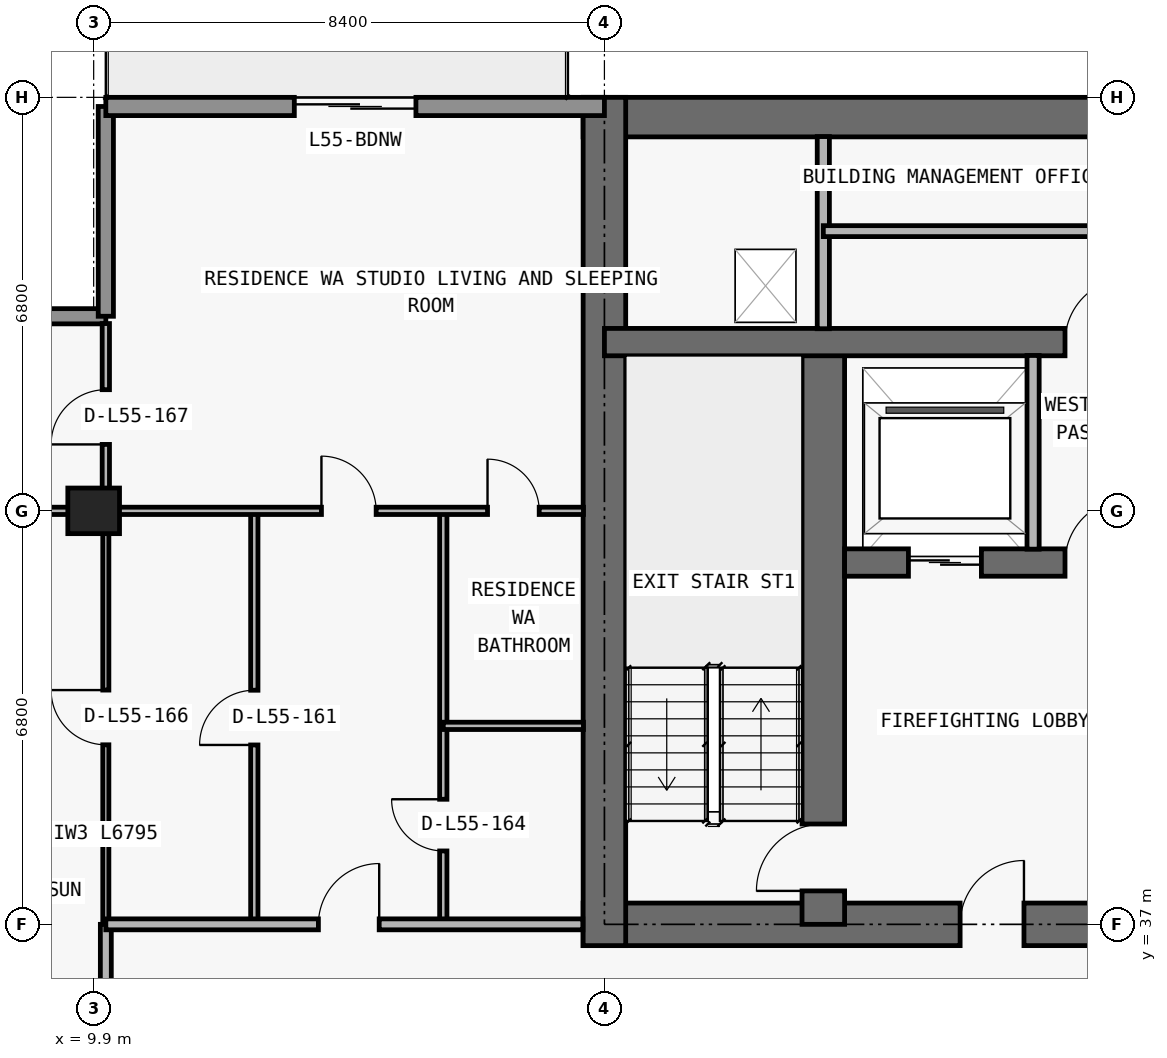
"""IFC4 building model, lengths in metres.
Left out: names, types, materials, properties, quantities, classifications, styles, units other than length and angle.
Written with IfcOpenShell. Run it as: python <this file> out.ifc"""

import sys

from ifc_helpers import new_model, si_unit, direction, frame, frame_2d, origin, origin_2d, place, context, subcontext, project, spatial, rectangle, extrude, element, fill, save


model = new_model("IFC4")
c1 = context("Model", 3, precision=1e-05, world=origin(), true_north=direction((0.0, 1.0)))
c2 = subcontext(c1, "Body", "Model", "MODEL_VIEW")
j1 = project(units=[si_unit("LENGTHUNIT", "METRE"), si_unit("PLANEANGLEUNIT", "RADIAN")], contexts=[c1])
p1 = place(None, origin())
s1 = spatial("IfcSite", under=j1, at=p1, CompositionType="ELEMENT")
p2 = place(p1, origin())
s2 = spatial("IfcBuilding", under=s1, at=p2, CompositionType="ELEMENT")
p3 = place(p2, frame((0.0, 0.0, 198.3)))
s3 = spatial("IfcBuildingStorey", under=s2, at=p3, CompositionType="ELEMENT", Elevation=198.3)
p4 = place(p3, frame((9.9, 43.8, 0.0), z_axis=(0.0, 0.0, 1.0), x_axis=(1.0, 0.0, 0.0)))
e1 = element("IfcColumn", 1, at=p4, inside=s3, PredefinedType="COLUMN", context=c2, shape_type="SweptSolid", body=[
    extrude(rectangle(XDim=0.85, YDim=0.75, at=origin_2d()), origin(), (0.0, 0.0, 1.0), 3.05),
])
p5 = place(p3, frame((17.95, 37.0, 0.0), z_axis=(0.0, 0.0, 1.0), x_axis=(1.0, 0.0, 0.0)))
e2 = element("IfcWall", 2, at=p5, inside=s3, PredefinedType="SHEAR", context=c2, shape_type="SweptSolid", body=[
    extrude(rectangle(XDim=41.9, YDim=0.7, at=frame_2d((20.95, 0.0))), origin(), (0.0, 0.0, 1.0), 3.05),
])
p6 = place(p5, frame((14.35, 0.0, 0.0)))
e3 = element("IfcOpeningElement", 3, at=p6, cuts=e2, PredefinedType="OPENING", context=c2, shape_type="SweptSolid", body=[
    extrude(rectangle(XDim=1.1, YDim=2.15, at=frame_2d((0.55, 1.075))), frame((0.0, 0.36, 0.0), z_axis=(0.0, -1.0, 0.0), x_axis=(1.0, 0.0, 0.0)), (0.0, 0.0, 1.0), 0.72),
])
p7 = place(p5, frame((6.2, 0.0, 0.0)))
e4 = element("IfcOpeningElement", 4, at=p7, cuts=e2, PredefinedType="OPENING", context=c2, shape_type="SweptSolid", body=[
    extrude(rectangle(XDim=1.05, YDim=2.15, at=frame_2d((0.525, 1.075))), frame((0.0, 0.36, 0.0), z_axis=(0.0, -1.0, 0.0), x_axis=(1.0, 0.0, 0.0)), (0.0, 0.0, 1.0), 0.72),
])
p8 = place(p5, frame((34.7, 0.0, 0.0)))
e5 = element("IfcOpeningElement", 5, at=p8, cuts=e2, PredefinedType="OPENING", context=c2, shape_type="SweptSolid", body=[
    extrude(rectangle(XDim=1.05, YDim=2.15, at=frame_2d((0.525, 1.075))), frame((0.0, 0.36, 0.0), z_axis=(0.0, -1.0, 0.0), x_axis=(1.0, 0.0, 0.0)), (0.0, 0.0, 1.0), 0.72),
])
p9 = place(p5, frame((10.812, 0.0, 0.0)))
e6 = element("IfcOpeningElement", 6, at=p9, cuts=e2, PredefinedType="OPENING", context=c2, shape_type="SweptSolid", body=[
    extrude(rectangle(XDim=1.05, YDim=2.15, at=frame_2d((0.525, 1.075))), frame((0.0, 0.36, 0.0), z_axis=(0.0, -1.0, 0.0), x_axis=(1.0, 0.0, 0.0)), (0.0, 0.0, 1.0), 0.72),
])
p10 = place(p5, frame((24.05, 0.0, 0.0)))
e7 = element("IfcOpeningElement", 7, at=p10, cuts=e2, PredefinedType="OPENING", context=c2, shape_type="SweptSolid", body=[
    extrude(rectangle(XDim=1.05, YDim=2.15, at=frame_2d((0.525, 1.075))), frame((0.0, 0.36, 0.0), z_axis=(0.0, -1.0, 0.0), x_axis=(1.0, 0.0, 0.0)), (0.0, 0.0, 1.0), 0.72),
])
p11 = place(p3, frame((17.95, 50.275, 0.0), z_axis=(0.0, 0.0, 1.0), x_axis=(1.0, 0.0, 0.0)))
e8 = element("IfcWall", 8, at=p11, inside=s3, PredefinedType="SHEAR", context=c2, shape_type="SweptSolid", body=[
    extrude(rectangle(XDim=41.9, YDim=0.65, at=frame_2d((20.95, 0.0))), origin(), (0.0, 0.0, 1.0), 3.05),
])
p12 = place(p3, frame((18.3, 36.65, 0.0), z_axis=(0.0, 0.0, 1.0), x_axis=(0.0, 1.0, 0.0)))
e9 = element("IfcWall", 9, at=p12, inside=s3, PredefinedType="SHEAR", context=c2, shape_type="SweptSolid", body=[
    extrude(rectangle(XDim=13.95, YDim=0.7, at=frame_2d((6.975, 0.0))), origin(), (0.0, 0.0, 1.0), 3.05),
])
p13 = place(p3, frame((21.9, 37.0, 0.0), z_axis=(0.0, 0.0, 1.0), x_axis=(0.0, 1.0, 0.0)))
e10 = element("IfcWall", 10, at=p13, inside=s3, PredefinedType="SHEAR", context=c2, shape_type="SweptSolid", body=[
    extrude(rectangle(XDim=9.575, YDim=0.7, at=frame_2d((4.788, 0.0))), origin(), (0.0, 0.0, 1.0), 3.05),
])
p14 = place(p13, frame((0.55, 0.0, 0.0)))
e11 = element("IfcOpeningElement", 11, at=p14, cuts=e10, PredefinedType="OPENING", context=c2, shape_type="SweptSolid", body=[
    extrude(rectangle(XDim=1.1, YDim=2.15, at=frame_2d((0.55, 1.075))), frame((0.0, 0.36, 0.0), z_axis=(0.0, -1.0, 0.0), x_axis=(1.0, 0.0, 0.0)), (0.0, 0.0, 1.0), 0.72),
])
p15 = place(p3, frame((22.25, 42.95, 0.0), z_axis=(0.0, 0.0, 1.0), x_axis=(1.0, 0.0, 0.0)))
e12 = element("IfcWall", 12, at=p15, inside=s3, PredefinedType="SHEAR", context=c2, shape_type="SweptSolid", body=[
    extrude(rectangle(XDim=33.3, YDim=0.45, at=frame_2d((16.65, 0.0))), origin(), (0.0, 0.0, 1.0), 3.05),
])
p16 = place(p15, frame((1.05, 0.0, 0.0)))
e13 = element("IfcOpeningElement", 13, at=p16, cuts=e12, PredefinedType="OPENING", context=c2, shape_type="SweptSolid", body=[
    extrude(rectangle(XDim=1.2, YDim=2.2, at=frame_2d((0.6, 1.1))), frame((0.0, 0.235, 0.0), z_axis=(0.0, -1.0, 0.0), x_axis=(1.0, 0.0, 0.0)), (0.0, 0.0, 1.0), 0.47),
])
p17 = place(p15, frame((31.05, 0.0, 0.0)))
e14 = element("IfcOpeningElement", 14, at=p17, cuts=e12, PredefinedType="OPENING", context=c2, shape_type="SweptSolid", body=[
    extrude(rectangle(XDim=1.2, YDim=2.2, at=frame_2d((0.6, 1.1))), frame((0.0, 0.235, 0.0), z_axis=(0.0, -1.0, 0.0), x_axis=(1.0, 0.0, 0.0)), (0.0, 0.0, 1.0), 0.47),
])
p18 = place(p15, frame((26.45, 0.0, 0.0)))
e15 = element("IfcOpeningElement", 15, at=p18, cuts=e12, PredefinedType="OPENING", context=c2, shape_type="SweptSolid", body=[
    extrude(rectangle(XDim=1.1, YDim=2.2, at=frame_2d((0.55, 1.1))), frame((0.0, 0.235, 0.0), z_axis=(0.0, -1.0, 0.0), x_axis=(1.0, 0.0, 0.0)), (0.0, 0.0, 1.0), 0.47),
])
p19 = place(p15, frame((5.95, 0.0, 0.0)))
e16 = element("IfcOpeningElement", 16, at=p19, cuts=e12, PredefinedType="OPENING", context=c2, shape_type="SweptSolid", body=[
    extrude(rectangle(XDim=1.1, YDim=2.2, at=frame_2d((0.55, 1.1))), frame((0.0, 0.235, 0.0), z_axis=(0.0, -1.0, 0.0), x_axis=(1.0, 0.0, 0.0)), (0.0, 0.0, 1.0), 0.47),
])
p20 = place(p15, frame((3.625, 0.0, 0.0)))
e17 = element("IfcOpeningElement", 17, at=p20, cuts=e12, PredefinedType="OPENING", context=c2, shape_type="SweptSolid", body=[
    extrude(rectangle(XDim=1.05, YDim=2.15, at=frame_2d((0.525, 1.075))), frame((0.0, 0.235, 0.0), z_axis=(0.0, -1.0, 0.0), x_axis=(1.0, 0.0, 0.0)), (0.0, 0.0, 1.0), 0.47),
])
p21 = place(p15, frame((28.675, 0.0, 0.0)))
e18 = element("IfcOpeningElement", 18, at=p21, cuts=e12, PredefinedType="OPENING", context=c2, shape_type="SweptSolid", body=[
    extrude(rectangle(XDim=1.05, YDim=2.15, at=frame_2d((0.525, 1.075))), frame((0.0, 0.235, 0.0), z_axis=(0.0, -1.0, 0.0), x_axis=(1.0, 0.0, 0.0)), (0.0, 0.0, 1.0), 0.47),
])
p22 = place(p15, frame((15.225, 0.0, 0.0)))
e19 = element("IfcOpeningElement", 19, at=p22, cuts=e12, PredefinedType="OPENING", context=c2, shape_type="SweptSolid", body=[
    extrude(rectangle(XDim=1.0, YDim=2.2, at=frame_2d((0.5, 1.1))), frame((0.0, 0.235, 0.0), z_axis=(0.0, -1.0, 0.0), x_axis=(1.0, 0.0, 0.0)), (0.0, 0.0, 1.0), 0.47),
])
p23 = place(p15, frame((21.975, 0.0, 0.0)))
e20 = element("IfcOpeningElement", 20, at=p23, cuts=e12, PredefinedType="OPENING", context=c2, shape_type="SweptSolid", body=[
    extrude(rectangle(XDim=1.0, YDim=2.2, at=frame_2d((0.5, 1.1))), frame((0.0, 0.235, 0.0), z_axis=(0.0, -1.0, 0.0), x_axis=(1.0, 0.0, 0.0)), (0.0, 0.0, 1.0), 0.47),
])
p24 = place(p3, frame((18.3, 46.575, 0.0), z_axis=(0.0, 0.0, 1.0), x_axis=(1.0, 0.0, 0.0)))
e21 = element("IfcWall", 21, at=p24, inside=s3, PredefinedType="SHEAR", context=c2, shape_type="SweptSolid", body=[
    extrude(rectangle(XDim=41.2, YDim=0.45, at=frame_2d((20.6, 0.0))), origin(), (0.0, 0.0, 1.0), 3.05),
])
p25 = place(p24, frame((7.575, 0.0, 0.0)))
e22 = element("IfcOpeningElement", 22, at=p25, cuts=e21, PredefinedType="OPENING", context=c2, shape_type="SweptSolid", body=[
    extrude(rectangle(XDim=1.05, YDim=2.15, at=frame_2d((0.525, 1.075))), frame((0.0, 0.235, 0.0), z_axis=(0.0, -1.0, 0.0), x_axis=(1.0, 0.0, 0.0)), (0.0, 0.0, 1.0), 0.47),
])
p26 = place(p24, frame((32.625, 0.0, 0.0)))
e23 = element("IfcOpeningElement", 23, at=p26, cuts=e21, PredefinedType="OPENING", context=c2, shape_type="SweptSolid", body=[
    extrude(rectangle(XDim=1.05, YDim=2.15, at=frame_2d((0.525, 1.075))), frame((0.0, 0.235, 0.0), z_axis=(0.0, -1.0, 0.0), x_axis=(1.0, 0.0, 0.0)), (0.0, 0.0, 1.0), 0.47),
])
p27 = place(p3, frame((6.25, 47.0, 0.0), z_axis=(0.0, 0.0, 1.0), x_axis=(1.0, 0.0, 0.0)))
e24 = element("IfcWall", 24, at=p27, inside=s3, PredefinedType="ELEMENTEDWALL", context=c2, shape_type="SweptSolid", body=[
    extrude(rectangle(XDim=3.85, YDim=0.25, at=frame_2d((1.925, 0.0))), origin(), (0.0, 0.0, 1.0), 3.05),
])
p28 = place(p3, frame((10.1, 47.0, 0.0), z_axis=(0.0, 0.0, 1.0), x_axis=(0.0, 1.0, 0.0)))
e25 = element("IfcWall", 25, at=p28, inside=s3, PredefinedType="ELEMENTEDWALL", context=c2, shape_type="SweptSolid", body=[
    extrude(rectangle(XDim=3.45, YDim=0.25, at=frame_2d((1.725, 0.0))), origin(), (0.0, 0.0, 1.0), 3.05),
])
p29 = place(p3, frame((10.1, 50.45, 0.0), z_axis=(0.0, 0.0, 1.0), x_axis=(1.0, 0.0, 0.0)))
e26 = element("IfcWall", 26, at=p29, inside=s3, PredefinedType="STANDARD", context=c2, shape_type="SweptSolid", body=[
    extrude(rectangle(XDim=8.2, YDim=0.3, at=frame_2d((4.1, 0.0))), origin(), (0.0, 0.0, 1.0), 3.05),
])
p30 = place(p29, frame((3.1, 0.0, 0.0)))
e27 = element("IfcOpeningElement", 27, at=p30, cuts=e26, PredefinedType="OPENING", context=c2, shape_type="SweptSolid", body=[
    extrude(rectangle(XDim=2.0, YDim=2.3, at=frame_2d((1.0, 1.15))), frame((0.0, 0.16, 0.0), z_axis=(0.0, -1.0, 0.0), x_axis=(1.0, 0.0, 0.0)), (0.0, 0.0, 1.0), 0.32),
])
p31 = place(p3, frame((10.1, 34.705, 0.0), z_axis=(0.0, 0.0, 1.0), x_axis=(0.0, 1.0, 0.0)))
e28 = element("IfcWall", 28, at=p31, inside=s3, PredefinedType="PARTITIONING", context=c2, shape_type="SweptSolid", body=[
    extrude(rectangle(XDim=2.295, YDim=0.18, at=frame_2d((1.147, 0.0))), origin(), (0.0, 0.0, 1.0), 2.263),
])
p32 = place(p3, frame((10.1, 37.005, 0.0), z_axis=(0.0, 0.0, 1.0), x_axis=(0.0, 1.0, 0.0)))
e29 = element("IfcWall", 29, at=p32, inside=s3, PredefinedType="MOVABLE", context=c2, shape_type="SweptSolid", body=[
    extrude(rectangle(XDim=6.795, YDim=0.1, at=frame_2d((3.397, 0.0))), origin(), (0.0, 0.0, 1.0), 2.263),
])
p33 = place(p32, frame((2.948, 0.0, 0.0)))
e30 = element("IfcOpeningElement", 30, at=p33, cuts=e29, PredefinedType="OPENING", context=c2, shape_type="SweptSolid", body=[
    extrude(rectangle(XDim=0.9, YDim=2.15, at=frame_2d((0.45, 1.075))), frame((0.0, 0.06, 0.0), z_axis=(0.0, -1.0, 0.0), x_axis=(1.0, 0.0, 0.0)), (0.0, 0.0, 1.0), 0.12),
])
p34 = place(p3, frame((10.1, 43.805, 0.0), z_axis=(0.0, 0.0, 1.0), x_axis=(0.0, 1.0, 0.0)))
e31 = element("IfcWall", 31, at=p34, inside=s3, PredefinedType="PARTITIONING", context=c2, shape_type="SweptSolid", body=[
    extrude(rectangle(XDim=3.075, YDim=0.12, at=frame_2d((1.538, 0.0))), origin(), (0.0, 0.0, 1.0), 3.05),
])
p35 = place(p34, frame((1.087, 0.0, 0.0)))
e32 = element("IfcOpeningElement", 32, at=p35, cuts=e31, PredefinedType="OPENING", context=c2, shape_type="SweptSolid", body=[
    extrude(rectangle(XDim=0.9, YDim=2.15, at=frame_2d((0.45, 1.075))), frame((0.0, 0.07, 0.0), z_axis=(0.0, -1.0, 0.0), x_axis=(1.0, 0.0, 0.0)), (0.0, 0.0, 1.0), 0.14),
])
p36 = place(p3, frame((12.542, 37.0, 0.0), z_axis=(0.0, 0.0, 1.0), x_axis=(0.0, 1.0, 0.0)))
e33 = element("IfcWall", 33, at=p36, inside=s3, PredefinedType="PARTITIONING", context=c2, shape_type="SweptSolid", body=[
    extrude(rectangle(XDim=6.8, YDim=0.12, at=frame_2d((3.4, 0.0))), origin(), (0.0, 0.0, 1.0), 3.05),
])
p37 = place(p36, frame((2.95, 0.0, 0.0)))
e34 = element("IfcOpeningElement", 34, at=p37, cuts=e33, PredefinedType="OPENING", context=c2, shape_type="SweptSolid", body=[
    extrude(rectangle(XDim=0.9, YDim=2.15, at=frame_2d((0.45, 1.075))), frame((0.0, 0.07, 0.0), z_axis=(0.0, -1.0, 0.0), x_axis=(1.0, 0.0, 0.0)), (0.0, 0.0, 1.0), 0.14),
])
p38 = place(p3, frame((15.65, 37.0, 0.0), z_axis=(0.0, 0.0, 1.0), x_axis=(0.0, 1.0, 0.0)))
e35 = element("IfcWall", 35, at=p38, inside=s3, PredefinedType="PARTITIONING", context=c2, shape_type="SweptSolid", body=[
    extrude(rectangle(XDim=6.8, YDim=0.12, at=frame_2d((3.4, 0.0))), origin(), (0.0, 0.0, 1.0), 3.05),
])
p39 = place(p38, frame((1.207, 0.0, 0.0)))
e36 = element("IfcOpeningElement", 36, at=p39, cuts=e35, PredefinedType="OPENING", context=c2, shape_type="SweptSolid", body=[
    extrude(rectangle(XDim=0.85, YDim=2.1, at=frame_2d((0.425, 1.05))), frame((0.0, 0.07, 0.0), z_axis=(0.0, -1.0, 0.0), x_axis=(1.0, 0.0, 0.0)), (0.0, 0.0, 1.0), 0.14),
])
p40 = place(p3, frame((21.9, 46.795, 0.0), z_axis=(0.0, 0.0, 1.0), x_axis=(0.0, 1.0, 0.0)))
e37 = element("IfcWall", 37, at=p40, inside=s3, PredefinedType="PARTITIONING", context=c2, shape_type="SweptSolid", body=[
    extrude(rectangle(XDim=3.16, YDim=0.2, at=frame_2d((1.58, 0.0))), origin(), (0.0, 0.0, 1.0), 3.05),
])
p41 = place(p3, frame((25.35, 43.17, 0.0), z_axis=(0.0, 0.0, 1.0), x_axis=(0.0, 1.0, 0.0)))
e38 = element("IfcWall", 38, at=p41, inside=s3, PredefinedType="PARTITIONING", context=c2, shape_type="SweptSolid", body=[
    extrude(rectangle(XDim=3.185, YDim=0.2, at=frame_2d((1.593, 0.0))), origin(), (0.0, 0.0, 1.0), 3.05),
])
p42 = place(p3, frame((10.1, 37.0, 0.0), z_axis=(0.0, 0.0, 1.0), x_axis=(1.0, 0.0, 0.0)))
e39 = element("IfcWall", 39, at=p42, inside=s3, PredefinedType="PARTITIONING", context=c2, shape_type="SweptSolid", body=[
    extrude(rectangle(XDim=7.845, YDim=0.18, at=frame_2d((3.922, 0.0))), origin(), (0.0, 0.0, 1.0), 3.05),
])
p43 = place(p42, frame((3.496, 0.0, 0.0)))
e40 = element("IfcOpeningElement", 40, at=p43, cuts=e39, PredefinedType="OPENING", context=c2, shape_type="SweptSolid", body=[
    extrude(rectangle(XDim=1.0, YDim=2.2, at=frame_2d((0.5, 1.1))), frame((0.0, 0.1, 0.0), z_axis=(0.0, -1.0, 0.0), x_axis=(1.0, 0.0, 0.0)), (0.0, 0.0, 1.0), 0.2),
])
p44 = place(p3, frame((15.65, 40.264, 0.0), z_axis=(0.0, 0.0, 1.0), x_axis=(1.0, 0.0, 0.0)))
e41 = element("IfcWall", 41, at=p44, inside=s3, PredefinedType="PARTITIONING", context=c2, shape_type="SweptSolid", body=[
    extrude(rectangle(XDim=2.305, YDim=0.12, at=frame_2d((1.153, 0.0))), origin(), (0.0, 0.0, 1.0), 3.05),
])
p45 = place(p3, frame((6.395, 43.8, 0.0), z_axis=(0.0, 0.0, 1.0), x_axis=(1.0, 0.0, 0.0)))
e42 = element("IfcWall", 42, at=p45, inside=s3, PredefinedType="PARTITIONING", context=c2, shape_type="SweptSolid", body=[
    extrude(rectangle(XDim=11.56, YDim=0.12, at=frame_2d((5.78, 0.0))), origin(), (0.0, 0.0, 1.0), 2.418),
])
p46 = place(p45, frame((7.251, 0.0, 0.0)))
e43 = element("IfcOpeningElement", 43, at=p46, cuts=e42, PredefinedType="OPENING", context=c2, shape_type="SweptSolid", body=[
    extrude(rectangle(XDim=0.9, YDim=2.15, at=frame_2d((0.45, 1.075))), frame((0.0, 0.07, 0.0), z_axis=(0.0, -1.0, 0.0), x_axis=(1.0, 0.0, 0.0)), (0.0, 0.0, 1.0), 0.14),
])
p47 = place(p45, frame((9.982, 0.0, 0.0)))
e44 = element("IfcOpeningElement", 44, at=p47, cuts=e42, PredefinedType="OPENING", context=c2, shape_type="SweptSolid", body=[
    extrude(rectangle(XDim=0.85, YDim=2.1, at=frame_2d((0.425, 1.05))), frame((0.0, 0.07, 0.0), z_axis=(0.0, -1.0, 0.0), x_axis=(1.0, 0.0, 0.0)), (0.0, 0.0, 1.0), 0.14),
])
p48 = place(p3, frame((21.9, 48.4, 0.0), z_axis=(0.0, 0.0, 1.0), x_axis=(1.0, 0.0, 0.0)))
e45 = element("IfcWall", 45, at=p48, inside=s3, PredefinedType="PARTITIONING", context=c2, shape_type="SweptSolid", body=[
    extrude(rectangle(XDim=34.0, YDim=0.18, at=frame_2d((17.0, 0.0))), origin(), (0.0, 0.0, 1.0), 3.05),
])
p49 = place(p48, frame((8.0, 0.0, 0.0)))
e46 = element("IfcOpeningElement", 46, at=p49, cuts=e45, PredefinedType="OPENING", context=c2, shape_type="SweptSolid", body=[
    extrude(rectangle(XDim=1.0, YDim=2.2, at=frame_2d((0.5, 1.1))), frame((0.0, 0.1, 0.0), z_axis=(0.0, -1.0, 0.0), x_axis=(1.0, 0.0, 0.0)), (0.0, 0.0, 1.0), 0.2),
])
p50 = place(p48, frame((25.0, 0.0, 0.0)))
e47 = element("IfcOpeningElement", 47, at=p50, cuts=e45, PredefinedType="OPENING", context=c2, shape_type="SweptSolid", body=[
    extrude(rectangle(XDim=1.0, YDim=2.2, at=frame_2d((0.5, 1.1))), frame((0.0, 0.1, 0.0), z_axis=(0.0, -1.0, 0.0), x_axis=(1.0, 0.0, 0.0)), (0.0, 0.0, 1.0), 0.2),
])
p51 = place(p30, origin())
e48 = element("IfcDoor", 48, at=p51, inside=s3, OperationType="DOUBLE_DOOR_SLIDING", PredefinedType="DOOR", context=c2, shape_type="SweptSolid", body=[
    extrude(rectangle(XDim=2.0, YDim=2.3, at=frame_2d((1.0, 1.15))), frame((0.0, 0.025, 0.0), z_axis=(0.0, -1.0, 0.0), x_axis=(1.0, 0.0, 0.0)), (0.0, 0.0, 1.0), 0.05),
])
fill(e27, e48)
p52 = place(p16, origin())
e49 = element("IfcDoor", 49, at=p52, inside=s3, OperationType="DOUBLE_DOOR_SLIDING", PredefinedType="DOOR", context=c2, shape_type="SweptSolid", body=[
    extrude(rectangle(XDim=1.2, YDim=2.2, at=frame_2d((0.6, 1.1))), frame((0.0, 0.025, 0.0), z_axis=(0.0, -1.0, 0.0), x_axis=(1.0, 0.0, 0.0)), (0.0, 0.0, 1.0), 0.05),
])
fill(e13, e49)
p53 = place(p7, origin())
e50 = element("IfcDoor", 50, at=p53, inside=s3, OperationType="SINGLE_SWING_RIGHT", PredefinedType="DOOR", context=c2, shape_type="SweptSolid", body=[
    extrude(rectangle(XDim=1.05, YDim=2.15, at=frame_2d((0.525, 1.075))), frame((0.0, 0.025, 0.0), z_axis=(0.0, -1.0, 0.0), x_axis=(1.0, 0.0, 0.0)), (0.0, 0.0, 1.0), 0.05),
])
fill(e4, e50)
p54 = place(p14, origin())
e51 = element("IfcDoor", 51, at=p54, inside=s3, OperationType="SINGLE_SWING_LEFT", PredefinedType="DOOR", context=c2, shape_type="SweptSolid", body=[
    extrude(rectangle(XDim=1.1, YDim=2.15, at=frame_2d((0.55, 1.075))), frame((0.0, 0.025, 0.0), z_axis=(0.0, -1.0, 0.0), x_axis=(1.0, 0.0, 0.0)), (0.0, 0.0, 1.0), 0.05),
])
fill(e11, e51)
p55 = place(p20, origin())
e52 = element("IfcDoor", 52, at=p55, inside=s3, OperationType="SINGLE_SWING_RIGHT", PredefinedType="DOOR", context=c2, shape_type="SweptSolid", body=[
    extrude(rectangle(XDim=1.05, YDim=2.15, at=frame_2d((0.525, 1.075))), frame((0.0, 0.025, 0.0), z_axis=(0.0, -1.0, 0.0), x_axis=(1.0, 0.0, 0.0)), (0.0, 0.0, 1.0), 0.05),
])
fill(e17, e52)
p56 = place(p25, origin())
e53 = element("IfcDoor", 53, at=p56, inside=s3, OperationType="SINGLE_SWING_RIGHT", PredefinedType="DOOR", context=c2, shape_type="SweptSolid", body=[
    extrude(rectangle(XDim=1.05, YDim=2.15, at=frame_2d((0.525, 1.075))), frame((0.0, 0.025, 0.0), z_axis=(0.0, -1.0, 0.0), x_axis=(1.0, 0.0, 0.0)), (0.0, 0.0, 1.0), 0.05),
])
fill(e22, e53)
p57 = place(p37, origin())
e54 = element("IfcDoor", 54, at=p57, inside=s3, OperationType="SINGLE_SWING_LEFT", PredefinedType="DOOR", context=c2, shape_type="SweptSolid", body=[
    extrude(rectangle(XDim=0.9, YDim=2.15, at=frame_2d((0.45, 1.075))), frame((0.0, 0.025, 0.0), z_axis=(0.0, -1.0, 0.0), x_axis=(1.0, 0.0, 0.0)), (0.0, 0.0, 1.0), 0.05),
])
fill(e34, e54)
p58 = place(p43, origin())
e55 = element("IfcDoor", 55, at=p58, inside=s3, OperationType="SINGLE_SWING_RIGHT", PredefinedType="DOOR", context=c2, shape_type="SweptSolid", body=[
    extrude(rectangle(XDim=1.0, YDim=2.2, at=frame_2d((0.5, 1.1))), frame((0.0, 0.025, 0.0), z_axis=(0.0, -1.0, 0.0), x_axis=(1.0, 0.0, 0.0)), (0.0, 0.0, 1.0), 0.05),
])
fill(e40, e55)
p59 = place(p46, origin())
e56 = element("IfcDoor", 56, at=p59, inside=s3, OperationType="SINGLE_SWING_LEFT", PredefinedType="DOOR", context=c2, shape_type="SweptSolid", body=[
    extrude(rectangle(XDim=0.9, YDim=2.15, at=frame_2d((0.45, 1.075))), frame((0.0, 0.025, 0.0), z_axis=(0.0, -1.0, 0.0), x_axis=(1.0, 0.0, 0.0)), (0.0, 0.0, 1.0), 0.05),
])
fill(e43, e56)
p60 = place(p39, origin())
e57 = element("IfcDoor", 57, at=p60, inside=s3, OperationType="SINGLE_SWING_RIGHT", PredefinedType="DOOR", context=c2, shape_type="SweptSolid", body=[
    extrude(rectangle(XDim=0.85, YDim=2.1, at=frame_2d((0.425, 1.05))), frame((0.0, 0.025, 0.0), z_axis=(0.0, -1.0, 0.0), x_axis=(1.0, 0.0, 0.0)), (0.0, 0.0, 1.0), 0.05),
])
fill(e36, e57)
p61 = place(p47, origin())
e58 = element("IfcDoor", 58, at=p61, inside=s3, OperationType="SINGLE_SWING_LEFT", PredefinedType="DOOR", context=c2, shape_type="SweptSolid", body=[
    extrude(rectangle(XDim=0.85, YDim=2.1, at=frame_2d((0.425, 1.05))), frame((0.0, 0.025, 0.0), z_axis=(0.0, -1.0, 0.0), x_axis=(1.0, 0.0, 0.0)), (0.0, 0.0, 1.0), 0.05),
])
fill(e44, e58)
p62 = place(p33, origin())
e59 = element("IfcDoor", 59, at=p62, inside=s3, OperationType="SINGLE_SWING_RIGHT", PredefinedType="DOOR", context=c2, shape_type="SweptSolid", body=[
    extrude(rectangle(XDim=0.9, YDim=2.15, at=frame_2d((0.45, 1.075))), frame((0.0, 0.025, 0.0), z_axis=(0.0, -1.0, 0.0), x_axis=(1.0, 0.0, 0.0)), (0.0, 0.0, 1.0), 0.05),
])
fill(e30, e59)
p63 = place(p35, origin())
e60 = element("IfcDoor", 60, at=p63, inside=s3, OperationType="SINGLE_SWING_LEFT", PredefinedType="DOOR", context=c2, shape_type="SweptSolid", body=[
    extrude(rectangle(XDim=0.9, YDim=2.15, at=frame_2d((0.45, 1.075))), frame((0.0, 0.025, 0.0), z_axis=(0.0, -1.0, 0.0), x_axis=(1.0, 0.0, 0.0)), (0.0, 0.0, 1.0), 0.05),
])
fill(e32, e60)
save(model, sys.argv[1])
